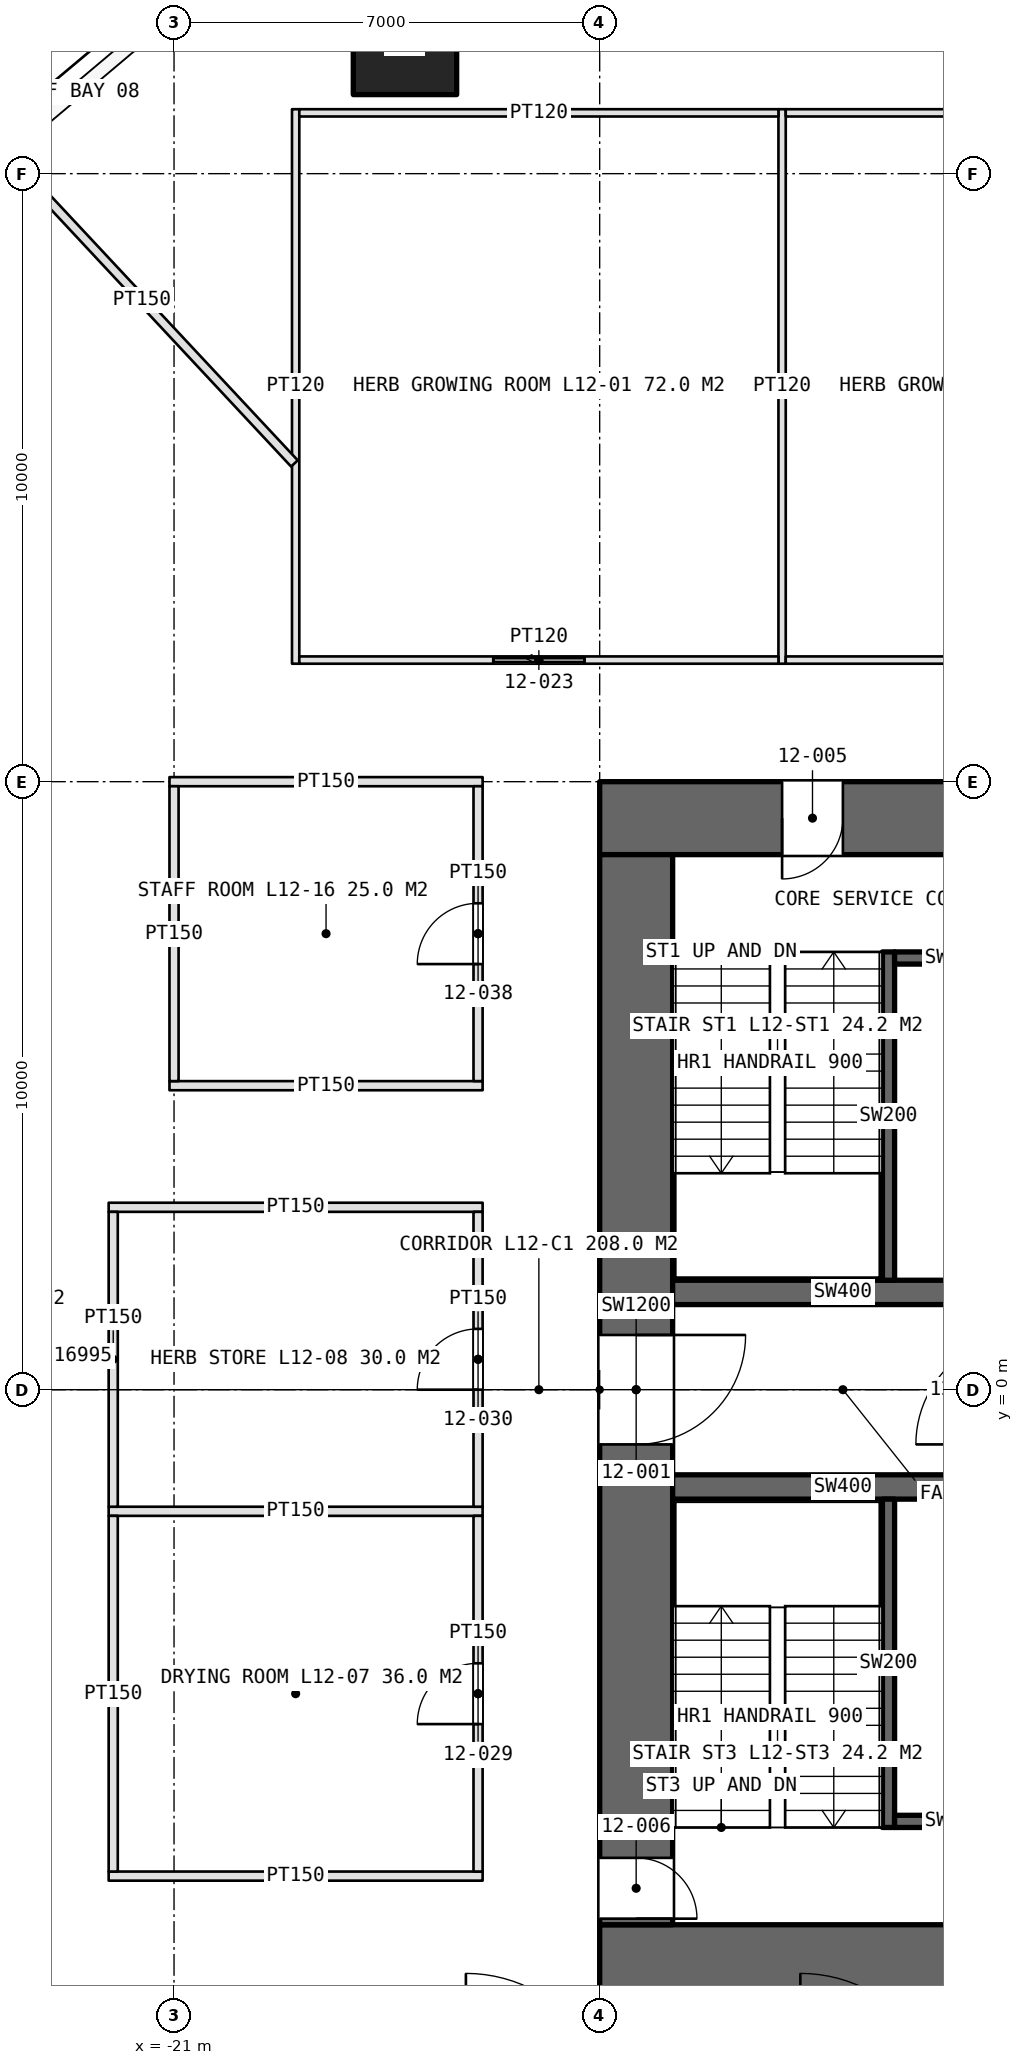
"""IFC4 building model, lengths in metres.
Left out: names, types, materials, properties, quantities, classifications, styles, units other than length and angle.
Written with IfcOpenShell. Run it as: python <this file> out.ifc"""

import sys

from ifc_helpers import new_model, si_unit, direction, frame, frame_2d, origin, origin_2d, place, context, subcontext, project, spatial, rectangle, extrude, element, fill, save


model = new_model("IFC4")
c1 = context("Model", 3, precision=1e-05, world=origin(), true_north=direction((0.0, 1.0)))
c2 = subcontext(c1, "Body", "Model", "MODEL_VIEW")
j1 = project(units=[si_unit("LENGTHUNIT", "METRE"), si_unit("PLANEANGLEUNIT", "RADIAN")], contexts=[c1])
p1 = place(None, origin())
s1 = spatial("IfcSite", under=j1, at=p1, CompositionType="ELEMENT")
p2 = place(p1, origin())
s2 = spatial("IfcBuilding", under=s1, at=p2, CompositionType="ELEMENT")
p3 = place(p2, frame((0.0, 0.0, 60.0)))
s3 = spatial("IfcBuildingStorey", under=s2, at=p3, CompositionType="ELEMENT", Elevation=60.0)
p4 = place(p3, frame((-14.0, -9.4, 0.0), z_axis=(0.0, 0.0, 1.0), x_axis=(1.0, 0.0, 0.0)))
e1 = element("IfcWall", 1, at=p4, inside=s3, PredefinedType="SHEAR", context=c2, shape_type="SweptSolid", body=[
    extrude(rectangle(XDim=28.0, YDim=1.2, at=frame_2d((14.0, 0.0))), origin(), (0.0, 0.0, 1.0), 5.0),
])
p5 = place(p4, frame((13.1, 0.0, 0.0)))
e2 = element("IfcOpeningElement", 2, at=p5, cuts=e1, PredefinedType="OPENING", context=c2, shape_type="SweptSolid", body=[
    extrude(rectangle(XDim=1.8, YDim=2.4, at=frame_2d((0.9, 1.2))), frame((0.0, 0.61, 0.0), z_axis=(0.0, -1.0, 0.0), x_axis=(1.0, 0.0, 0.0)), (0.0, 0.0, 1.0), 1.22),
])
p6 = place(p4, frame((22.9, 0.0, 0.0)))
e3 = element("IfcOpeningElement", 3, at=p6, cuts=e1, PredefinedType="OPENING", context=c2, shape_type="SweptSolid", body=[
    extrude(rectangle(XDim=2.2, YDim=2.7, at=frame_2d((1.1, 1.35))), frame((0.0, 0.61, 0.0), z_axis=(0.0, -1.0, 0.0), x_axis=(1.0, 0.0, 0.0)), (0.0, 0.0, 1.0), 1.22),
])
p7 = place(p3, frame((14.0, 9.4, 0.0), z_axis=(0.0, 0.0, 1.0), x_axis=(-1.0, 0.0, 0.0)))
e4 = element("IfcWall", 4, at=p7, inside=s3, PredefinedType="SHEAR", context=c2, shape_type="SweptSolid", body=[
    extrude(rectangle(XDim=28.0, YDim=1.2, at=frame_2d((14.0, 0.0))), origin(), (0.0, 0.0, 1.0), 5.0),
])
p8 = place(p7, frame((24.0, 0.0, 0.0)))
e5 = element("IfcOpeningElement", 5, at=p8, cuts=e4, PredefinedType="OPENING", context=c2, shape_type="SweptSolid", body=[
    extrude(rectangle(XDim=1.0, YDim=2.4, at=frame_2d((0.5, 1.2))), frame((0.0, 0.61, 0.0), z_axis=(0.0, -1.0, 0.0), x_axis=(1.0, 0.0, 0.0)), (0.0, 0.0, 1.0), 1.22),
])
p9 = place(p7, frame((13.1, 0.0, 0.0)))
e6 = element("IfcOpeningElement", 6, at=p9, cuts=e4, PredefinedType="OPENING", context=c2, shape_type="SweptSolid", body=[
    extrude(rectangle(XDim=1.8, YDim=2.4, at=frame_2d((0.9, 1.2))), frame((0.0, 0.61, 0.0), z_axis=(0.0, -1.0, 0.0), x_axis=(1.0, 0.0, 0.0)), (0.0, 0.0, 1.0), 1.22),
])
p10 = place(p3, frame((-13.4, 8.8, 0.0), z_axis=(0.0, 0.0, 1.0), x_axis=(0.0, -1.0, 0.0)))
e7 = element("IfcWall", 7, at=p10, inside=s3, PredefinedType="SHEAR", context=c2, shape_type="SweptSolid", body=[
    extrude(rectangle(XDim=17.6, YDim=1.2, at=frame_2d((8.8, 0.0))), origin(), (0.0, 0.0, 1.0), 5.0),
])
p11 = place(p10, frame((7.9, 0.0, 0.0)))
e8 = element("IfcOpeningElement", 8, at=p11, cuts=e7, PredefinedType="OPENING", context=c2, shape_type="SweptSolid", body=[
    extrude(rectangle(XDim=1.8, YDim=2.4, at=frame_2d((0.9, 1.2))), frame((0.0, 0.61, 0.0), z_axis=(0.0, -1.0, 0.0), x_axis=(1.0, 0.0, 0.0)), (0.0, 0.0, 1.0), 1.22),
])
p12 = place(p10, frame((16.5, 0.0, 0.0)))
e9 = element("IfcOpeningElement", 9, at=p12, cuts=e7, PredefinedType="OPENING", context=c2, shape_type="SweptSolid", body=[
    extrude(rectangle(XDim=1.0, YDim=2.4, at=frame_2d((0.5, 1.2))), frame((0.0, 0.61, 0.0), z_axis=(0.0, -1.0, 0.0), x_axis=(1.0, 0.0, 0.0)), (0.0, 0.0, 1.0), 1.22),
])
for number, where, z_axis, x_axis in (
    (10, (-12.8, 1.6, 0.0), (0.0, 0.0, 1.0), (1.0, 0.0, 0.0)),
    (11, (-12.8, -1.6, 0.0), (0.0, 0.0, 1.0), (1.0, 0.0, 0.0)),
):
    element("IfcWall", number, at=place(p3, frame(where, z_axis=z_axis, x_axis=x_axis)), inside=s3, PredefinedType="SHEAR", context=c2, shape_type="SweptSolid", body=[
        extrude(rectangle(XDim=5.6, YDim=0.4, at=frame_2d((2.8, 0.0))), origin(), (0.0, 0.0, 1.0), 5.0),
    ])
p13 = place(p3, frame((-17.202, 22.15, 0.0), z_axis=(0.0, 0.0, 1.0), x_axis=(1.0, 0.0, 0.0)))
e12 = element("IfcColumn", 12, at=p13, inside=s3, PredefinedType="COLUMN", context=c2, shape_type="SweptSolid", body=[
    extrude(rectangle(XDim=1.7, YDim=1.7, at=origin_2d()), origin(), (0.0, 0.0, 1.0), 5.0),
])
p14 = place(p3, frame((-9.25, 7.2, 0.0), z_axis=(0.0, 0.0, 1.0), x_axis=(0.0, -1.0, 0.0)))
e13 = element("IfcWall", 13, at=p14, inside=s3, PredefinedType="SOLIDWALL", context=c2, shape_type="SweptSolid", body=[
    extrude(rectangle(XDim=5.4, YDim=0.2, at=frame_2d((2.7, 0.0))), origin(), (0.0, 0.0, 1.0), 5.0),
])
p15 = place(p3, frame((-9.15, 7.1, 0.0), z_axis=(0.0, 0.0, 1.0), x_axis=(1.0, 0.0, 0.0)))
e14 = element("IfcWall", 14, at=p15, inside=s3, PredefinedType="SOLIDWALL", context=c2, shape_type="SweptSolid", body=[
    extrude(rectangle(XDim=1.95, YDim=0.2, at=frame_2d((0.975, 0.0))), origin(), (0.0, 0.0, 1.0), 5.0),
])
p16 = place(p3, frame((-9.25, -7.2, 0.0), z_axis=(0.0, 0.0, 1.0), x_axis=(0.0, 1.0, 0.0)))
e15 = element("IfcWall", 15, at=p16, inside=s3, PredefinedType="SOLIDWALL", context=c2, shape_type="SweptSolid", body=[
    extrude(rectangle(XDim=5.4, YDim=0.2, at=frame_2d((2.7, 0.0))), origin(), (0.0, 0.0, 1.0), 5.0),
])
p17 = place(p3, frame((-9.15, -7.1, 0.0), z_axis=(0.0, 0.0, 1.0), x_axis=(1.0, 0.0, 0.0)))
e16 = element("IfcWall", 16, at=p17, inside=s3, PredefinedType="SOLIDWALL", context=c2, shape_type="SweptSolid", body=[
    extrude(rectangle(XDim=1.95, YDim=0.2, at=frame_2d((0.975, 0.0))), origin(), (0.0, 0.0, 1.0), 5.0),
])
for number, where, z_axis, x_axis in (
    (17, (-19.0, 11.94, 0.0), (0.0, 0.0, 1.0), (0.0, 1.0, 0.0)),
    (18, (-11.0, 11.94, 0.0), (0.0, 0.0, 1.0), (0.0, 1.0, 0.0)),
):
    element("IfcWall", number, at=place(p3, frame(where, z_axis=z_axis, x_axis=x_axis)), inside=s3, PredefinedType="PARTITIONING", context=c2, shape_type="SweptSolid", body=[
        extrude(rectangle(XDim=9.12, YDim=0.12, at=frame_2d((4.56, 0.0))), origin(), (0.0, 0.0, 1.0), 3.6),
    ])
p18 = place(p3, frame((-18.94, 12.0, 0.0), z_axis=(0.0, 0.0, 1.0), x_axis=(1.0, 0.0, 0.0)))
e19 = element("IfcWall", 19, at=p18, inside=s3, PredefinedType="PARTITIONING", context=c2, shape_type="SweptSolid", body=[
    extrude(rectangle(XDim=7.88, YDim=0.12, at=frame_2d((3.94, 0.0))), origin(), (0.0, 0.0, 1.0), 3.6),
])
p19 = place(p18, frame((3.19, 0.0, 0.0)))
e20 = element("IfcOpeningElement", 20, at=p19, cuts=e19, PredefinedType="OPENING", context=c2, shape_type="SweptSolid", body=[
    extrude(rectangle(XDim=1.5, YDim=2.5, at=frame_2d((0.75, 1.25))), frame((0.0, 0.07, 0.0), z_axis=(0.0, -1.0, 0.0), x_axis=(1.0, 0.0, 0.0)), (0.0, 0.0, 1.0), 0.14),
])
p20 = place(p3, frame((-18.94, 21.0, 0.0), z_axis=(0.0, 0.0, 1.0), x_axis=(1.0, 0.0, 0.0)))
e21 = element("IfcWall", 21, at=p20, inside=s3, PredefinedType="PARTITIONING", context=c2, shape_type="SweptSolid", body=[
    extrude(rectangle(XDim=7.88, YDim=0.12, at=frame_2d((3.94, 0.0))), origin(), (0.0, 0.0, 1.0), 3.6),
])
p21 = place(p3, frame((-10.94, 12.0, 0.0), z_axis=(0.0, 0.0, 1.0), x_axis=(1.0, 0.0, 0.0)))
e22 = element("IfcWall", 22, at=p21, inside=s3, PredefinedType="PARTITIONING", context=c2, shape_type="SweptSolid", body=[
    extrude(rectangle(XDim=7.88, YDim=0.12, at=frame_2d((3.94, 0.0))), origin(), (0.0, 0.0, 1.0), 3.6),
])
p22 = place(p21, frame((3.19, 0.0, 0.0)))
e23 = element("IfcOpeningElement", 23, at=p22, cuts=e22, PredefinedType="OPENING", context=c2, shape_type="SweptSolid", body=[
    extrude(rectangle(XDim=1.5, YDim=2.5, at=frame_2d((0.75, 1.25))), frame((0.0, 0.07, 0.0), z_axis=(0.0, -1.0, 0.0), x_axis=(1.0, 0.0, 0.0)), (0.0, 0.0, 1.0), 0.14),
])
p23 = place(p3, frame((-10.94, 21.0, 0.0), z_axis=(0.0, 0.0, 1.0), x_axis=(1.0, 0.0, 0.0)))
e24 = element("IfcWall", 24, at=p23, inside=s3, PredefinedType="PARTITIONING", context=c2, shape_type="SweptSolid", body=[
    extrude(rectangle(XDim=7.88, YDim=0.12, at=frame_2d((3.94, 0.0))), origin(), (0.0, 0.0, 1.0), 3.6),
])
for number, where, z_axis, x_axis in (
    (25, (-15.925, -8.0, 0.0), (0.0, 0.0, 1.0), (-1.0, 0.0, 0.0)),
    (26, (-15.925, -2.0, 0.0), (0.0, 0.0, 1.0), (-1.0, 0.0, 0.0)),
    (27, (-15.925, 3.0, 0.0), (0.0, 0.0, 1.0), (-1.0, 0.0, 0.0)),
):
    element("IfcWall", number, at=place(p3, frame(where, z_axis=z_axis, x_axis=x_axis)), inside=s3, PredefinedType="PARTITIONING", context=c2, shape_type="SweptSolid", body=[
        extrude(rectangle(XDim=6.15, YDim=0.15, at=frame_2d((3.075, 0.0))), origin(), (0.0, 0.0, 1.0), 3.6),
    ])
p24 = place(p3, frame((-16.0, -7.925, 0.0), z_axis=(0.0, 0.0, 1.0), x_axis=(0.0, 1.0, 0.0)))
e28 = element("IfcWall", 28, at=p24, inside=s3, PredefinedType="PARTITIONING", context=c2, shape_type="SweptSolid", body=[
    extrude(rectangle(XDim=5.85, YDim=0.15, at=frame_2d((2.925, 0.0))), origin(), (0.0, 0.0, 1.0), 3.6),
])
p25 = place(p24, frame((2.425, 0.0, 0.0)))
e29 = element("IfcOpeningElement", 29, at=p25, cuts=e28, PredefinedType="OPENING", context=c2, shape_type="SweptSolid", body=[
    extrude(rectangle(XDim=1.0, YDim=2.2, at=frame_2d((0.5, 1.1))), frame((0.0, 0.085, 0.0), z_axis=(0.0, -1.0, 0.0), x_axis=(1.0, 0.0, 0.0)), (0.0, 0.0, 1.0), 0.17),
])
p26 = place(p3, frame((-22.0, -7.925, 0.0), z_axis=(0.0, 0.0, 1.0), x_axis=(0.0, 1.0, 0.0)))
e30 = element("IfcWall", 30, at=p26, inside=s3, PredefinedType="PARTITIONING", context=c2, shape_type="SweptSolid", body=[
    extrude(rectangle(XDim=5.85, YDim=0.15, at=frame_2d((2.925, 0.0))), origin(), (0.0, 0.0, 1.0), 3.6),
])
p27 = place(p3, frame((-16.0, -1.925, 0.0), z_axis=(0.0, 0.0, 1.0), x_axis=(0.0, 1.0, 0.0)))
e31 = element("IfcWall", 31, at=p27, inside=s3, PredefinedType="PARTITIONING", context=c2, shape_type="SweptSolid", body=[
    extrude(rectangle(XDim=4.85, YDim=0.15, at=frame_2d((2.425, 0.0))), origin(), (0.0, 0.0, 1.0), 3.6),
])
p28 = place(p27, frame((1.925, 0.0, 0.0)))
e32 = element("IfcOpeningElement", 32, at=p28, cuts=e31, PredefinedType="OPENING", context=c2, shape_type="SweptSolid", body=[
    extrude(rectangle(XDim=1.0, YDim=2.2, at=frame_2d((0.5, 1.1))), frame((0.0, 0.085, 0.0), z_axis=(0.0, -1.0, 0.0), x_axis=(1.0, 0.0, 0.0)), (0.0, 0.0, 1.0), 0.17),
])
p29 = place(p3, frame((-22.0, -1.925, 0.0), z_axis=(0.0, 0.0, 1.0), x_axis=(0.0, 1.0, 0.0)))
e33 = element("IfcWall", 33, at=p29, inside=s3, PredefinedType="PARTITIONING", context=c2, shape_type="SweptSolid", body=[
    extrude(rectangle(XDim=4.85, YDim=0.15, at=frame_2d((2.425, 0.0))), origin(), (0.0, 0.0, 1.0), 3.6),
])
for number, where, z_axis, x_axis in (
    (34, (-15.925, 5.0, 0.0), (0.0, 0.0, 1.0), (-1.0, 0.0, 0.0)),
    (35, (-15.925, 10.0, 0.0), (0.0, 0.0, 1.0), (-1.0, 0.0, 0.0)),
):
    element("IfcWall", number, at=place(p3, frame(where, z_axis=z_axis, x_axis=x_axis)), inside=s3, PredefinedType="PARTITIONING", context=c2, shape_type="SweptSolid", body=[
        extrude(rectangle(XDim=5.15, YDim=0.15, at=frame_2d((2.575, 0.0))), origin(), (0.0, 0.0, 1.0), 3.6),
    ])
p30 = place(p3, frame((-16.0, 5.075, 0.0), z_axis=(0.0, 0.0, 1.0), x_axis=(0.0, 1.0, 0.0)))
e36 = element("IfcWall", 36, at=p30, inside=s3, PredefinedType="PARTITIONING", context=c2, shape_type="SweptSolid", body=[
    extrude(rectangle(XDim=4.85, YDim=0.15, at=frame_2d((2.425, 0.0))), origin(), (0.0, 0.0, 1.0), 3.6),
])
p31 = place(p30, frame((1.925, 0.0, 0.0)))
e37 = element("IfcOpeningElement", 37, at=p31, cuts=e36, PredefinedType="OPENING", context=c2, shape_type="SweptSolid", body=[
    extrude(rectangle(XDim=1.0, YDim=2.2, at=frame_2d((0.5, 1.1))), frame((0.0, 0.085, 0.0), z_axis=(0.0, -1.0, 0.0), x_axis=(1.0, 0.0, 0.0)), (0.0, 0.0, 1.0), 0.17),
])
p32 = place(p3, frame((-21.0, 5.075, 0.0), z_axis=(0.0, 0.0, 1.0), x_axis=(0.0, 1.0, 0.0)))
e38 = element("IfcWall", 38, at=p32, inside=s3, PredefinedType="PARTITIONING", context=c2, shape_type="SweptSolid", body=[
    extrude(rectangle(XDim=4.85, YDim=0.15, at=frame_2d((2.425, 0.0))), origin(), (0.0, 0.0, 1.0), 3.6),
])
p33 = place(p3, frame((-19.02, 15.234, 0.0), z_axis=(0.0, 0.0, 1.0), x_axis=(-0.682519491562, 0.730867391281, 0.0)))
e39 = element("IfcWall", 39, at=p33, inside=s3, PredefinedType="PARTITIONING", context=c2, shape_type="SweptSolid", body=[
    extrude(rectangle(XDim=7.347, YDim=0.15, at=frame_2d((3.674, 0.0))), origin(), (0.0, 0.0, 1.0), 3.6),
])
p34 = place(p11, origin())
e40 = element("IfcDoor", 40, at=p34, inside=s3, OperationType="DOUBLE_DOOR_SINGLE_SWING", PredefinedType="DOOR", context=c2, shape_type="SweptSolid", body=[
    extrude(rectangle(XDim=1.8, YDim=2.4, at=frame_2d((0.9, 1.2))), frame((0.0, 0.025, 0.0), z_axis=(0.0, -1.0, 0.0), x_axis=(1.0, 0.0, 0.0)), (0.0, 0.0, 1.0), 0.05),
])
fill(e8, e40)
p35 = place(p8, origin())
e41 = element("IfcDoor", 41, at=p35, inside=s3, OperationType="SINGLE_SWING_RIGHT", PredefinedType="DOOR", context=c2, shape_type="SweptSolid", body=[
    extrude(rectangle(XDim=1.0, YDim=2.4, at=frame_2d((0.5, 1.2))), frame((0.0, 0.025, 0.0), z_axis=(0.0, -1.0, 0.0), x_axis=(1.0, 0.0, 0.0)), (0.0, 0.0, 1.0), 0.05),
])
fill(e5, e41)
p36 = place(p12, origin())
e42 = element("IfcDoor", 42, at=p36, inside=s3, OperationType="SINGLE_SWING_RIGHT", PredefinedType="DOOR", context=c2, shape_type="SweptSolid", body=[
    extrude(rectangle(XDim=1.0, YDim=2.4, at=frame_2d((0.5, 1.2))), frame((0.0, 0.025, 0.0), z_axis=(0.0, -1.0, 0.0), x_axis=(1.0, 0.0, 0.0)), (0.0, 0.0, 1.0), 0.05),
])
fill(e9, e42)
p37 = place(p19, origin())
e43 = element("IfcDoor", 43, at=p37, inside=s3, OperationType="SLIDING_TO_LEFT", PredefinedType="DOOR", context=c2, shape_type="SweptSolid", body=[
    extrude(rectangle(XDim=1.5, YDim=2.5, at=frame_2d((0.75, 1.25))), frame((0.0, 0.025, 0.0), z_axis=(0.0, -1.0, 0.0), x_axis=(1.0, 0.0, 0.0)), (0.0, 0.0, 1.0), 0.05),
])
fill(e20, e43)
p38 = place(p25, origin())
e44 = element("IfcDoor", 44, at=p38, inside=s3, OperationType="SINGLE_SWING_LEFT", PredefinedType="DOOR", context=c2, shape_type="SweptSolid", body=[
    extrude(rectangle(XDim=1.0, YDim=2.2, at=frame_2d((0.5, 1.1))), frame((0.0, 0.025, 0.0), z_axis=(0.0, -1.0, 0.0), x_axis=(1.0, 0.0, 0.0)), (0.0, 0.0, 1.0), 0.05),
])
fill(e29, e44)
p39 = place(p28, origin())
e45 = element("IfcDoor", 45, at=p39, inside=s3, OperationType="SINGLE_SWING_LEFT", PredefinedType="DOOR", context=c2, shape_type="SweptSolid", body=[
    extrude(rectangle(XDim=1.0, YDim=2.2, at=frame_2d((0.5, 1.1))), frame((0.0, 0.025, 0.0), z_axis=(0.0, -1.0, 0.0), x_axis=(1.0, 0.0, 0.0)), (0.0, 0.0, 1.0), 0.05),
])
fill(e32, e45)
p40 = place(p31, origin())
e46 = element("IfcDoor", 46, at=p40, inside=s3, OperationType="SINGLE_SWING_LEFT", PredefinedType="DOOR", context=c2, shape_type="SweptSolid", body=[
    extrude(rectangle(XDim=1.0, YDim=2.2, at=frame_2d((0.5, 1.1))), frame((0.0, 0.025, 0.0), z_axis=(0.0, -1.0, 0.0), x_axis=(1.0, 0.0, 0.0)), (0.0, 0.0, 1.0), 0.05),
])
fill(e37, e46)
save(model, sys.argv[1])
